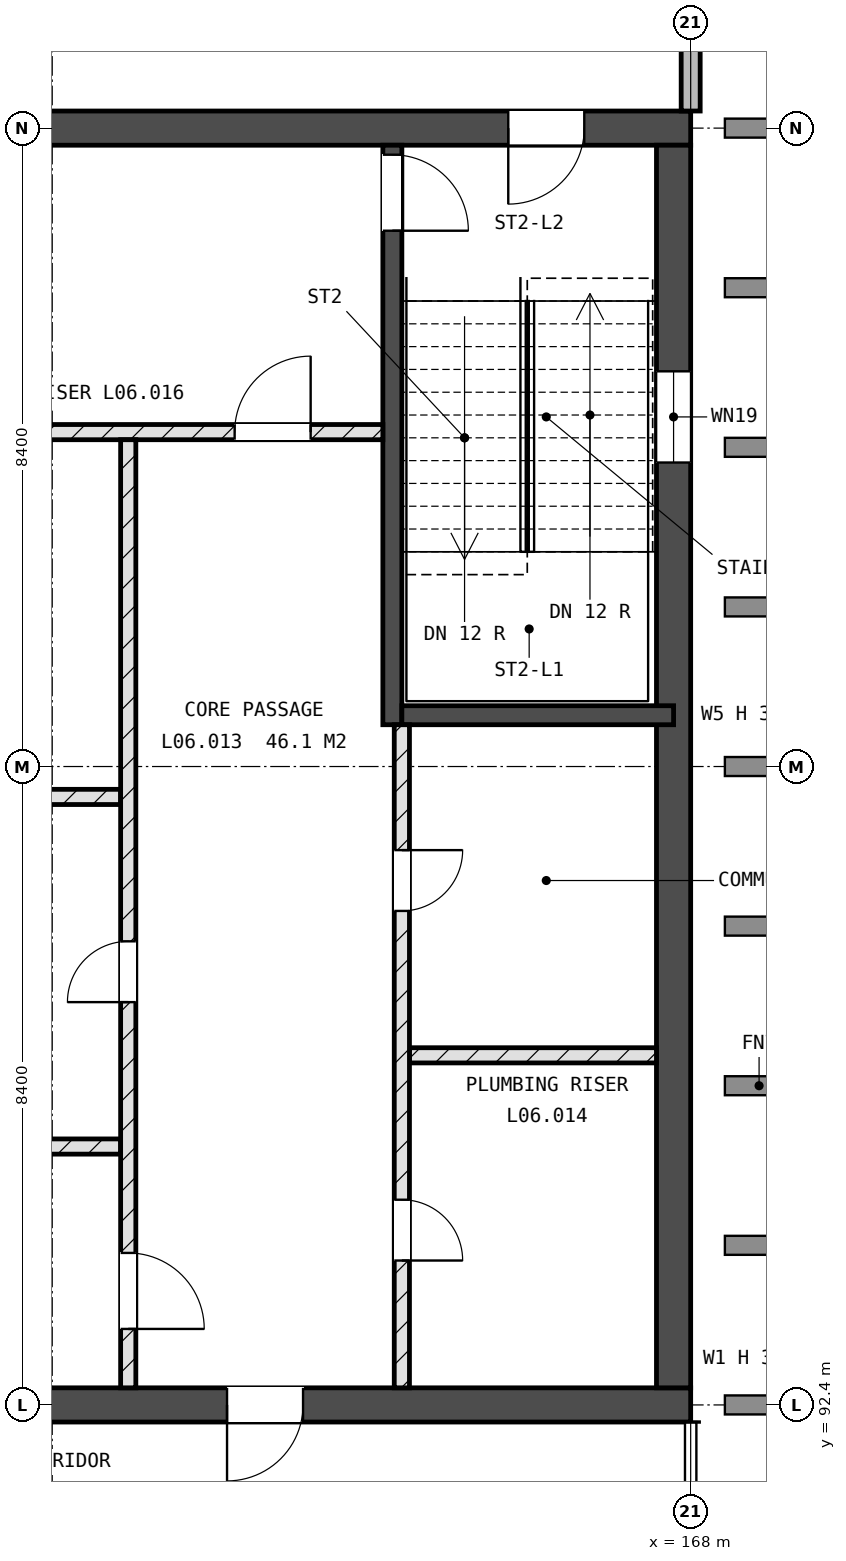
"""IFC4 building model, lengths in metres.
Left out: names, types, materials, properties, quantities, classifications, styles, units other than length and angle.
Written with IfcOpenShell. Run it as: python <this file> out.ifc"""

import sys

from ifc_helpers import new_model, si_unit, direction, frame, frame_2d, origin, place, context, subcontext, project, spatial, rectangle, extrude, element, fill, save


model = new_model("IFC4")
c1 = context("Model", 3, precision=1e-05, world=origin(), true_north=direction((0.0, 1.0)))
c2 = subcontext(c1, "Body", "Model", "MODEL_VIEW")
j1 = project(units=[si_unit("LENGTHUNIT", "METRE"), si_unit("PLANEANGLEUNIT", "RADIAN")], contexts=[c1])
p1 = place(None, origin())
s1 = spatial("IfcSite", under=j1, at=p1, CompositionType="ELEMENT")
p2 = place(p1, origin())
s2 = spatial("IfcBuilding", under=s1, at=p2, CompositionType="ELEMENT")
p3 = place(p2, frame((0.0, 0.0, 25.2)))
s3 = spatial("IfcBuildingStorey", under=s2, at=p3, CompositionType="ELEMENT", Elevation=25.2)
p4 = place(p3, frame((142.8, 92.4, -0.25), z_axis=(0.0, 0.0, 1.0), x_axis=(1.0, 0.0, 0.0)))
e1 = element("IfcWall", 1, at=p4, inside=s3, PredefinedType="SHEAR", context=c2, shape_type="SweptSolid", body=[
    extrude(rectangle(XDim=25.2, YDim=0.45, at=frame_2d((12.6, 0.0))), origin(), (0.0, 0.0, 1.0), 3.6),
])
p5 = place(p4, frame((1.4, 0.0, 0.25)))
e2 = element("IfcOpeningElement", 2, at=p5, cuts=e1, PredefinedType="OPENING", context=c2, shape_type="SweptSolid", body=[
    extrude(rectangle(XDim=1.0, YDim=2.1, at=frame_2d((0.5, 1.05))), frame((0.0, 0.235, 0.0), z_axis=(0.0, -1.0, 0.0), x_axis=(1.0, 0.0, 0.0)), (0.0, 0.0, 1.0), 0.47),
])
p6 = place(p4, frame((19.1, 0.0, 0.25)))
e3 = element("IfcOpeningElement", 3, at=p6, cuts=e1, PredefinedType="OPENING", context=c2, shape_type="SweptSolid", body=[
    extrude(rectangle(XDim=1.0, YDim=2.1, at=frame_2d((0.5, 1.05))), frame((0.0, 0.235, 0.0), z_axis=(0.0, -1.0, 0.0), x_axis=(1.0, 0.0, 0.0)), (0.0, 0.0, 1.0), 0.47),
])
p7 = place(p4, frame((10.4, 0.0, 0.25)))
e4 = element("IfcOpeningElement", 4, at=p7, cuts=e1, PredefinedType="OPENING", context=c2, shape_type="SweptSolid", body=[
    extrude(rectangle(XDim=1.0, YDim=2.1, at=frame_2d((0.5, 1.05))), frame((0.0, 0.235, 0.0), z_axis=(0.0, -1.0, 0.0), x_axis=(1.0, 0.0, 0.0)), (0.0, 0.0, 1.0), 0.47),
])
p8 = place(p3, frame((142.8, 109.2, -0.25), z_axis=(0.0, 0.0, 1.0), x_axis=(1.0, 0.0, 0.0)))
e5 = element("IfcWall", 5, at=p8, inside=s3, PredefinedType="SHEAR", context=c2, shape_type="SweptSolid", body=[
    extrude(rectangle(XDim=25.2, YDim=0.45, at=frame_2d((12.6, 0.0))), origin(), (0.0, 0.0, 1.0), 3.6),
])
p9 = place(p8, frame((22.8, 0.0, 0.25)))
e6 = element("IfcOpeningElement", 6, at=p9, cuts=e5, PredefinedType="OPENING", context=c2, shape_type="SweptSolid", body=[
    extrude(rectangle(XDim=1.0, YDim=2.1, at=frame_2d((0.5, 1.05))), frame((0.0, 0.235, 0.0), z_axis=(0.0, -1.0, 0.0), x_axis=(1.0, 0.0, 0.0)), (0.0, 0.0, 1.0), 0.47),
])
p10 = place(p8, frame((1.5, 0.0, 0.25)))
e7 = element("IfcOpeningElement", 7, at=p10, cuts=e5, PredefinedType="OPENING", context=c2, shape_type="SweptSolid", body=[
    extrude(rectangle(XDim=0.8, YDim=2.1, at=frame_2d((0.4, 1.05))), frame((0.0, 0.235, 0.0), z_axis=(0.0, -1.0, 0.0), x_axis=(1.0, 0.0, 0.0)), (0.0, 0.0, 1.0), 0.47),
])
p11 = place(p8, frame((13.4, 0.0, 0.25)))
e8 = element("IfcOpeningElement", 8, at=p11, cuts=e5, PredefinedType="OPENING", context=c2, shape_type="SweptSolid", body=[
    extrude(rectangle(XDim=1.0, YDim=2.1, at=frame_2d((0.5, 1.05))), frame((0.0, 0.235, 0.0), z_axis=(0.0, -1.0, 0.0), x_axis=(1.0, 0.0, 0.0)), (0.0, 0.0, 1.0), 0.47),
])
p12 = place(p3, frame((167.775, 92.625, -0.25), z_axis=(0.0, 0.0, 1.0), x_axis=(0.0, 1.0, 0.0)))
e9 = element("IfcWall", 9, at=p12, inside=s3, PredefinedType="SHEAR", context=c2, shape_type="SweptSolid", body=[
    extrude(rectangle(XDim=16.35, YDim=0.45, at=frame_2d((8.175, 0.0))), origin(), (0.0, 0.0, 1.0), 3.6),
])
p13 = place(p12, frame((12.175, 0.0, 1.85)))
e10 = element("IfcOpeningElement", 10, at=p13, cuts=e9, PredefinedType="OPENING", context=c2, shape_type="SweptSolid", body=[
    extrude(rectangle(XDim=1.2, YDim=0.9, at=frame_2d((0.6, 0.45))), frame((0.0, 0.235, 0.0), z_axis=(0.0, -1.0, 0.0), x_axis=(1.0, 0.0, 0.0)), (0.0, 0.0, 1.0), 0.47),
])
p14 = place(p3, frame((164.075, 101.35, -0.25), z_axis=(0.0, 0.0, 1.0), x_axis=(0.0, 1.0, 0.0)))
e11 = element("IfcWall", 11, at=p14, inside=s3, PredefinedType="SHEAR", context=c2, shape_type="SweptSolid", body=[
    extrude(rectangle(XDim=7.625, YDim=0.25, at=frame_2d((3.812, 0.0))), origin(), (0.0, 0.0, 1.0), 3.6),
])
p15 = place(p14, frame((6.5, 0.0, 0.25)))
e12 = element("IfcOpeningElement", 12, at=p15, cuts=e11, PredefinedType="OPENING", context=c2, shape_type="SweptSolid", body=[
    extrude(rectangle(XDim=1.0, YDim=2.1, at=frame_2d((0.5, 1.05))), frame((0.0, 0.135, 0.0), z_axis=(0.0, -1.0, 0.0), x_axis=(1.0, 0.0, 0.0)), (0.0, 0.0, 1.0), 0.27),
])
p16 = place(p3, frame((164.2, 101.475, -0.25), z_axis=(0.0, 0.0, 1.0), x_axis=(1.0, 0.0, 0.0)))
e13 = element("IfcWall", 13, at=p16, inside=s3, PredefinedType="SHEAR", context=c2, shape_type="SweptSolid", body=[
    extrude(rectangle(XDim=3.575, YDim=0.25, at=frame_2d((1.788, 0.0))), origin(), (0.0, 0.0, 1.0), 3.6),
])
p17 = place(p3, frame((168.0, 109.425, 0.0), z_axis=(0.0, 0.0, 1.0), x_axis=(0.0, 1.0, 0.0)))
e14 = element("IfcWall", 14, at=p17, inside=s3, PredefinedType="STANDARD", context=c2, shape_type="SweptSolid", body=[
    extrude(rectangle(XDim=1.575, YDim=0.25, at=frame_2d((0.788, 0.0))), origin(), (0.0, 0.0, 1.0), 3.3),
])
p18 = place(p3, frame((158.25, 95.8, 0.0), z_axis=(0.0, 0.0, 1.0), x_axis=(1.0, 0.0, 0.0)))
e15 = element("IfcWall", 15, at=p18, inside=s3, PredefinedType="SOLIDWALL", context=c2, shape_type="SweptSolid", body=[
    extrude(rectangle(XDim=2.25, YDim=0.2, at=frame_2d((1.125, 0.0))), origin(), (0.0, 0.0, 1.0), 3.3),
])
p19 = place(p3, frame((164.3, 97.0, 0.0), z_axis=(0.0, 0.0, 1.0), x_axis=(1.0, 0.0, 0.0)))
e16 = element("IfcWall", 16, at=p19, inside=s3, PredefinedType="SOLIDWALL", context=c2, shape_type="SweptSolid", body=[
    extrude(rectangle(XDim=3.25, YDim=0.2, at=frame_2d((1.625, 0.0))), origin(), (0.0, 0.0, 1.0), 3.3),
])
p20 = place(p3, frame((146.5, 100.4, 0.0), z_axis=(0.0, 0.0, 1.0), x_axis=(1.0, 0.0, 0.0)))
e17 = element("IfcWall", 17, at=p20, inside=s3, PredefinedType="SOLIDWALL", context=c2, shape_type="SweptSolid", body=[
    extrude(rectangle(XDim=14.0, YDim=0.2, at=frame_2d((7.0, 0.0))), origin(), (0.0, 0.0, 1.0), 3.3),
])
p21 = place(p3, frame((143.25, 105.2, 0.0), z_axis=(0.0, 0.0, 1.0), x_axis=(1.0, 0.0, 0.0)))
e18 = element("IfcWall", 18, at=p21, inside=s3, PredefinedType="SOLIDWALL", context=c2, shape_type="SweptSolid", body=[
    extrude(rectangle(XDim=20.7, YDim=0.2, at=frame_2d((10.35, 0.0))), origin(), (0.0, 0.0, 1.0), 3.3),
])
p22 = place(p21, frame((11.45, 0.0, 0.0)))
e19 = element("IfcOpeningElement", 19, at=p22, cuts=e18, PredefinedType="OPENING", context=c2, shape_type="SweptSolid", body=[
    extrude(rectangle(XDim=0.8, YDim=2.1, at=frame_2d((0.4, 1.05))), frame((0.0, 0.11, 0.0), z_axis=(0.0, -1.0, 0.0), x_axis=(1.0, 0.0, 0.0)), (0.0, 0.0, 1.0), 0.22),
])
p23 = place(p21, frame((18.75, 0.0, 0.0)))
e20 = element("IfcOpeningElement", 20, at=p23, cuts=e18, PredefinedType="OPENING", context=c2, shape_type="SweptSolid", body=[
    extrude(rectangle(XDim=1.0, YDim=2.1, at=frame_2d((0.5, 1.05))), frame((0.0, 0.11, 0.0), z_axis=(0.0, -1.0, 0.0), x_axis=(1.0, 0.0, 0.0)), (0.0, 0.0, 1.0), 0.22),
])
p24 = place(p3, frame((160.6, 92.625, 0.0), z_axis=(0.0, 0.0, 1.0), x_axis=(0.0, 1.0, 0.0)))
e21 = element("IfcWall", 21, at=p24, inside=s3, PredefinedType="SOLIDWALL", context=c2, shape_type="SweptSolid", body=[
    extrude(rectangle(XDim=12.475, YDim=0.2, at=frame_2d((6.238, 0.0))), origin(), (0.0, 0.0, 1.0), 3.3),
])
p25 = place(p24, frame((5.075, 0.0, 0.0)))
e22 = element("IfcOpeningElement", 22, at=p25, cuts=e21, PredefinedType="OPENING", context=c2, shape_type="SweptSolid", body=[
    extrude(rectangle(XDim=0.8, YDim=2.1, at=frame_2d((0.4, 1.05))), frame((0.0, 0.11, 0.0), z_axis=(0.0, -1.0, 0.0), x_axis=(1.0, 0.0, 0.0)), (0.0, 0.0, 1.0), 0.22),
])
p26 = place(p24, frame((0.775, 0.0, 0.0)))
e23 = element("IfcOpeningElement", 23, at=p26, cuts=e21, PredefinedType="OPENING", context=c2, shape_type="SweptSolid", body=[
    extrude(rectangle(XDim=1.0, YDim=2.1, at=frame_2d((0.5, 1.05))), frame((0.0, 0.11, 0.0), z_axis=(0.0, -1.0, 0.0), x_axis=(1.0, 0.0, 0.0)), (0.0, 0.0, 1.0), 0.22),
])
p27 = place(p3, frame((164.2, 92.625, 0.0), z_axis=(0.0, 0.0, 1.0), x_axis=(0.0, 1.0, 0.0)))
e24 = element("IfcWall", 24, at=p27, inside=s3, PredefinedType="SOLIDWALL", context=c2, shape_type="SweptSolid", body=[
    extrude(rectangle(XDim=8.725, YDim=0.2, at=frame_2d((4.363, 0.0))), origin(), (0.0, 0.0, 1.0), 3.3),
])
p28 = place(p27, frame((1.675, 0.0, 0.0)))
e25 = element("IfcOpeningElement", 25, at=p28, cuts=e24, PredefinedType="OPENING", context=c2, shape_type="SweptSolid", body=[
    extrude(rectangle(XDim=0.8, YDim=2.1, at=frame_2d((0.4, 1.05))), frame((0.0, 0.11, 0.0), z_axis=(0.0, -1.0, 0.0), x_axis=(1.0, 0.0, 0.0)), (0.0, 0.0, 1.0), 0.22),
])
p29 = place(p27, frame((6.275, 0.0, 0.0)))
e26 = element("IfcOpeningElement", 26, at=p29, cuts=e24, PredefinedType="OPENING", context=c2, shape_type="SweptSolid", body=[
    extrude(rectangle(XDim=0.8, YDim=2.1, at=frame_2d((0.4, 1.05))), frame((0.0, 0.11, 0.0), z_axis=(0.0, -1.0, 0.0), x_axis=(1.0, 0.0, 0.0)), (0.0, 0.0, 1.0), 0.22),
])
p30 = place(p13, origin())
e27 = element("IfcWindow", 27, at=p30, inside=s3, PartitioningType="SINGLE_PANEL", PredefinedType="WINDOW", context=c2, shape_type="SweptSolid", body=[
    extrude(rectangle(XDim=1.2, YDim=0.9, at=frame_2d((0.6, 0.45))), frame((0.0, 0.03, 0.0), z_axis=(0.0, -1.0, 0.0), x_axis=(1.0, 0.0, 0.0)), (0.0, 0.0, 1.0), 0.06),
])
fill(e10, e27)
p31 = place(p15, origin())
e28 = element("IfcDoor", 28, at=p31, inside=s3, OperationType="SINGLE_SWING_LEFT", PredefinedType="DOOR", context=c2, shape_type="SweptSolid", body=[
    extrude(rectangle(XDim=1.0, YDim=2.1, at=frame_2d((0.5, 1.05))), frame((0.0, 0.025, 0.0), z_axis=(0.0, -1.0, 0.0), x_axis=(1.0, 0.0, 0.0)), (0.0, 0.0, 1.0), 0.05),
])
fill(e12, e28)
p32 = place(p9, origin())
e29 = element("IfcDoor", 29, at=p32, inside=s3, OperationType="SINGLE_SWING_LEFT", PredefinedType="DOOR", context=c2, shape_type="SweptSolid", body=[
    extrude(rectangle(XDim=1.0, YDim=2.1, at=frame_2d((0.5, 1.05))), frame((0.0, 0.025, 0.0), z_axis=(0.0, -1.0, 0.0), x_axis=(1.0, 0.0, 0.0)), (0.0, 0.0, 1.0), 0.05),
])
fill(e6, e29)
p33 = place(p28, origin())
e30 = element("IfcDoor", 30, at=p33, inside=s3, OperationType="SINGLE_SWING_LEFT", PredefinedType="DOOR", context=c2, shape_type="SweptSolid", body=[
    extrude(rectangle(XDim=0.8, YDim=2.1, at=frame_2d((0.4, 1.05))), frame((0.0, 0.025, 0.0), z_axis=(0.0, -1.0, 0.0), x_axis=(1.0, 0.0, 0.0)), (0.0, 0.0, 1.0), 0.05),
])
fill(e25, e30)
p34 = place(p29, origin())
e31 = element("IfcDoor", 31, at=p34, inside=s3, OperationType="SINGLE_SWING_RIGHT", PredefinedType="DOOR", context=c2, shape_type="SweptSolid", body=[
    extrude(rectangle(XDim=0.8, YDim=2.1, at=frame_2d((0.4, 1.05))), frame((0.0, 0.025, 0.0), z_axis=(0.0, -1.0, 0.0), x_axis=(1.0, 0.0, 0.0)), (0.0, 0.0, 1.0), 0.05),
])
fill(e26, e31)
p35 = place(p25, origin())
e32 = element("IfcDoor", 32, at=p35, inside=s3, OperationType="SINGLE_SWING_RIGHT", PredefinedType="DOOR", context=c2, shape_type="SweptSolid", body=[
    extrude(rectangle(XDim=0.8, YDim=2.1, at=frame_2d((0.4, 1.05))), frame((0.0, 0.025, 0.0), z_axis=(0.0, -1.0, 0.0), x_axis=(1.0, 0.0, 0.0)), (0.0, 0.0, 1.0), 0.05),
])
fill(e22, e32)
p36 = place(p6, origin())
e33 = element("IfcDoor", 33, at=p36, inside=s3, OperationType="SINGLE_SWING_LEFT", PredefinedType="DOOR", context=c2, shape_type="SweptSolid", body=[
    extrude(rectangle(XDim=1.0, YDim=2.1, at=frame_2d((0.5, 1.05))), frame((0.0, 0.025, 0.0), z_axis=(0.0, -1.0, 0.0), x_axis=(1.0, 0.0, 0.0)), (0.0, 0.0, 1.0), 0.05),
])
fill(e3, e33)
p37 = place(p26, origin())
e34 = element("IfcDoor", 34, at=p37, inside=s3, OperationType="SINGLE_SWING_LEFT", PredefinedType="DOOR", context=c2, shape_type="SweptSolid", body=[
    extrude(rectangle(XDim=1.0, YDim=2.1, at=frame_2d((0.5, 1.05))), frame((0.0, 0.025, 0.0), z_axis=(0.0, -1.0, 0.0), x_axis=(1.0, 0.0, 0.0)), (0.0, 0.0, 1.0), 0.05),
])
fill(e23, e34)
p38 = place(p23, origin())
e35 = element("IfcDoor", 35, at=p38, inside=s3, OperationType="SINGLE_SWING_LEFT", PredefinedType="DOOR", context=c2, shape_type="SweptSolid", body=[
    extrude(rectangle(XDim=1.0, YDim=2.1, at=frame_2d((0.5, 1.05))), frame((0.0, 0.025, 0.0), z_axis=(0.0, -1.0, 0.0), x_axis=(1.0, 0.0, 0.0)), (0.0, 0.0, 1.0), 0.05),
])
fill(e20, e35)
save(model, sys.argv[1])
